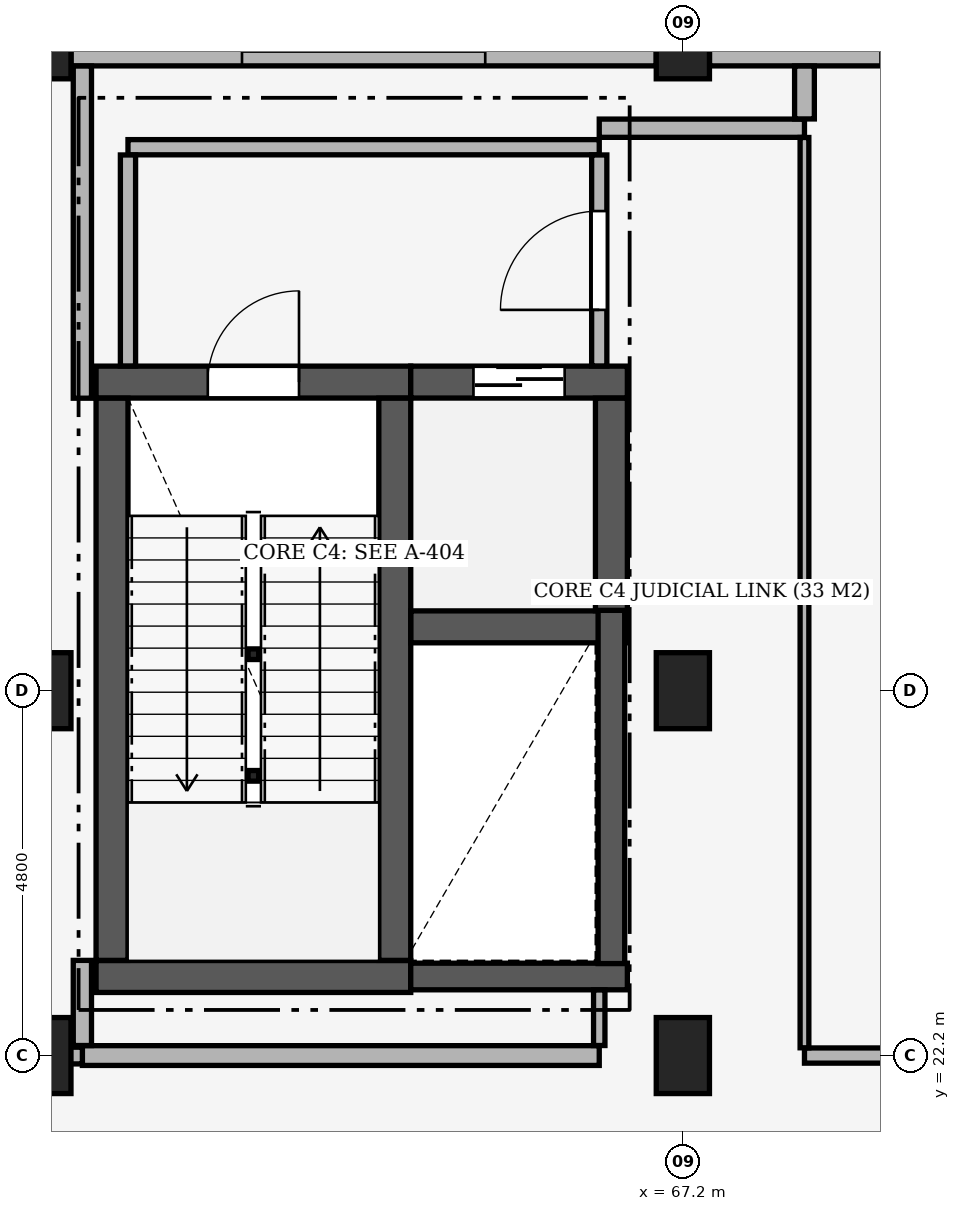
"""IFC4 building model, lengths in metres.
Left out: names, types, materials, properties, quantities, classifications, styles, units other than length and angle.
Written with IfcOpenShell. Run it as: python <this file> out.ifc"""

import sys

from ifc_helpers import new_model, si_unit, direction, frame, frame_2d, origin, origin_2d, place, context, subcontext, project, spatial, rectangle, hollow_circle, extrude, element, fill, save


model = new_model("IFC4")
c1 = context("Model", 3, precision=1e-05, world=origin(), true_north=direction((0.0, 1.0)))
c2 = subcontext(c1, "Body", "Model", "MODEL_VIEW")
j1 = project(units=[si_unit("LENGTHUNIT", "METRE"), si_unit("PLANEANGLEUNIT", "RADIAN")], contexts=[c1])
p1 = place(None, origin())
s1 = spatial("IfcSite", under=j1, at=p1, CompositionType="ELEMENT")
p2 = place(p1, origin())
s2 = spatial("IfcBuilding", under=s1, at=p2, CompositionType="ELEMENT")
p3 = place(p2, frame((0.0, 0.0, 5.1)))
s3 = spatial("IfcBuildingStorey", under=s2, at=p3, CompositionType="ELEMENT", Elevation=5.1)
for number, where, z_axis, x_axis in (
    (1, (58.8, 22.2, 0.0), (0.0, 0.0, 1.0), (1.0, 0.0, 0.0)),
    (2, (58.8, 27.0, 0.0), (0.0, 0.0, 1.0), (1.0, 0.0, 0.0)),
):
    element("IfcColumn", number, at=place(p3, frame(where, z_axis=z_axis, x_axis=x_axis)), inside=s3, PredefinedType="COLUMN", context=c2, shape_type="SweptSolid", body=[
        extrude(rectangle(XDim=0.7, YDim=1.0, at=origin_2d()), origin(), (0.0, 0.0, 1.0), 5.1),
    ])
p4 = place(p3, frame((58.8, 35.4, 0.0), z_axis=(0.0, 0.0, 1.0), x_axis=(1.0, 0.0, 0.0)))
e3 = element("IfcColumn", 3, at=p4, inside=s3, PredefinedType="COLUMN", context=c2, shape_type="SweptSolid", body=[
    extrude(rectangle(XDim=0.7, YDim=0.7, at=origin_2d()), origin(), (0.0, 0.0, 1.0), 5.1),
])
for number, where, z_axis, x_axis in (
    (4, (67.2, 22.2, 0.0), (0.0, 0.0, 1.0), (1.0, 0.0, 0.0)),
    (5, (67.2, 27.0, 0.0), (0.0, 0.0, 1.0), (1.0, 0.0, 0.0)),
):
    element("IfcColumn", number, at=place(p3, frame(where, z_axis=z_axis, x_axis=x_axis)), inside=s3, PredefinedType="COLUMN", context=c2, shape_type="SweptSolid", body=[
        extrude(rectangle(XDim=0.7, YDim=1.0, at=origin_2d()), origin(), (0.0, 0.0, 1.0), 5.1),
    ])
p5 = place(p3, frame((67.2, 35.4, 0.0), z_axis=(0.0, 0.0, 1.0), x_axis=(1.0, 0.0, 0.0)))
e6 = element("IfcColumn", 6, at=p5, inside=s3, PredefinedType="COLUMN", context=c2, shape_type="SweptSolid", body=[
    extrude(rectangle(XDim=0.7, YDim=0.7, at=origin_2d()), origin(), (0.0, 0.0, 1.0), 5.1),
])
for number, where, z_axis, x_axis in (
    (7, (61.55, 25.88, -2.98), (0.0, 0.0, 1.0), (1.0, 0.0, 0.0)),
    (8, (61.55, 27.48, -2.98), (0.0, 0.0, 1.0), (1.0, 0.0, 0.0)),
):
    element("IfcColumn", number, at=place(p3, frame(where, z_axis=z_axis, x_axis=x_axis)), inside=s3, PredefinedType="COLUMN", context=c2, shape_type="SweptSolid", body=[
        extrude(hollow_circle(Radius=0.07, WallThickness=0.008, at=origin_2d()), origin(), (0.0, 0.0, 1.0), 5.1),
    ])
p6 = place(p3, frame((59.15, 35.4, 0.0), z_axis=(0.0, 0.0, 1.0), x_axis=(1.0, 0.0, 0.0)))
e9 = element("IfcWall", 9, at=p6, inside=s3, PredefinedType="SOLIDWALL", context=c2, shape_type="SweptSolid", body=[
    extrude(rectangle(XDim=7.7, YDim=0.36, at=frame_2d((3.85, 0.0))), origin(), (0.0, 0.0, 1.0), 4.07),
])
p7 = place(p6, frame((2.25, 0.0, 0.75)))
e10 = element("IfcOpeningElement", 10, at=p7, cuts=e9, PredefinedType="OPENING", context=c2, shape_type="SweptSolid", body=[
    extrude(rectangle(XDim=3.2, YDim=2.6, at=frame_2d((1.6, 1.3))), frame((0.0, 0.195, 0.0), z_axis=(0.0, -1.0, 0.0), x_axis=(1.0, 0.0, 0.0)), (0.0, 0.0, 1.0), 0.39),
])
p8 = place(p3, frame((67.55, 35.4, 0.0), z_axis=(0.0, 0.0, 1.0), x_axis=(1.0, 0.0, 0.0)))
e11 = element("IfcWall", 11, at=p8, inside=s3, PredefinedType="SOLIDWALL", context=c2, shape_type="SweptSolid", body=[
    extrude(rectangle(XDim=7.7, YDim=0.36, at=frame_2d((3.85, 0.0))), origin(), (0.0, 0.0, 1.0), 4.07),
])
p9 = place(p8, frame((2.25, 0.0, 0.75)))
e12 = element("IfcOpeningElement", 12, at=p9, cuts=e11, PredefinedType="OPENING", context=c2, shape_type="SweptSolid", body=[
    extrude(rectangle(XDim=3.2, YDim=2.6, at=frame_2d((1.6, 1.3))), frame((0.0, 0.195, 0.0), z_axis=(0.0, -1.0, 0.0), x_axis=(1.0, 0.0, 0.0)), (0.0, 0.0, 1.0), 0.39),
])
p10 = place(p3, frame((59.48, 31.06, 0.0), z_axis=(0.0, 0.0, 1.0), x_axis=(1.0, 0.0, 0.0)))
e13 = element("IfcWall", 13, at=p10, inside=s3, PredefinedType="SHEAR", context=c2, shape_type="SweptSolid", body=[
    extrude(rectangle(XDim=4.14, YDim=0.42, at=frame_2d((2.07, 0.0))), origin(), (0.0, 0.0, 1.0), 4.82),
])
p11 = place(p10, frame((1.47, 0.0, 0.0)))
e14 = element("IfcOpeningElement", 14, at=p11, cuts=e13, PredefinedType="OPENING", context=c2, shape_type="SweptSolid", body=[
    extrude(rectangle(XDim=1.2, YDim=2.2, at=frame_2d((0.6, 1.1))), frame((0.0, 0.225, 0.0), z_axis=(0.0, -1.0, 0.0), x_axis=(1.0, 0.0, 0.0)), (0.0, 0.0, 1.0), 0.45),
])
p12 = place(p3, frame((59.48, 23.24, 0.0), z_axis=(0.0, 0.0, 1.0), x_axis=(1.0, 0.0, 0.0)))
e15 = element("IfcWall", 15, at=p12, inside=s3, PredefinedType="SHEAR", context=c2, shape_type="SweptSolid", body=[
    extrude(rectangle(XDim=4.14, YDim=0.42, at=frame_2d((2.07, 0.0))), origin(), (0.0, 0.0, 1.0), 4.82),
])
for number, where, z_axis, x_axis in (
    (16, (59.69, 23.452, 0.0), (0.0, 0.0, 1.0), (0.0, 1.0, 0.0)),
    (17, (63.41, 23.452, 0.0), (0.0, 0.0, 1.0), (0.0, 1.0, 0.0)),
):
    element("IfcWall", number, at=place(p3, frame(where, z_axis=z_axis, x_axis=x_axis)), inside=s3, PredefinedType="SHEAR", context=c2, shape_type="SweptSolid", body=[
        extrude(rectangle(XDim=7.396, YDim=0.42, at=frame_2d((3.698, 0.0))), origin(), (0.0, 0.0, 1.0), 4.82),
    ])
p13 = place(p3, frame((63.622, 27.84, 0.0), z_axis=(0.0, 0.0, 1.0), x_axis=(1.0, 0.0, 0.0)))
e18 = element("IfcWall", 18, at=p13, inside=s3, PredefinedType="SHEAR", context=c2, shape_type="SweptSolid", body=[
    extrude(rectangle(XDim=2.848, YDim=0.42, at=frame_2d((1.424, 0.0))), origin(), (0.0, 0.0, 1.0), 4.82),
])
p14 = place(p3, frame((63.62, 31.06, 0.0), z_axis=(0.0, 0.0, 1.0), x_axis=(1.0, 0.0, 0.0)))
e19 = element("IfcWall", 19, at=p14, inside=s3, PredefinedType="SHEAR", context=c2, shape_type="SweptSolid", body=[
    extrude(rectangle(XDim=2.85, YDim=0.42, at=frame_2d((1.425, 0.0))), origin(), (0.0, 0.0, 1.0), 4.82),
])
p15 = place(p14, frame((0.825, 0.0, 0.0)))
e20 = element("IfcOpeningElement", 20, at=p15, cuts=e19, PredefinedType="OPENING", context=c2, shape_type="SweptSolid", body=[
    extrude(rectangle(XDim=1.2, YDim=2.15, at=frame_2d((0.6, 1.075))), frame((0.0, 0.225, 0.0), z_axis=(0.0, -1.0, 0.0), x_axis=(1.0, 0.0, 0.0)), (0.0, 0.0, 1.0), 0.45),
])
p16 = place(p3, frame((66.26, 28.052, 0.0), z_axis=(0.0, 0.0, 1.0), x_axis=(0.0, 1.0, 0.0)))
e21 = element("IfcWall", 21, at=p16, inside=s3, PredefinedType="SHEAR", context=c2, shape_type="SweptSolid", body=[
    extrude(rectangle(XDim=2.796, YDim=0.42, at=frame_2d((1.398, 0.0))), origin(), (0.0, 0.0, 1.0), 4.82),
])
p17 = place(p3, frame((63.62, 23.24, 0.0), z_axis=(0.0, 0.0, 1.0), x_axis=(1.0, 0.0, 0.0)))
e22 = element("IfcWall", 22, at=p17, inside=s3, PredefinedType="SHEAR", context=c2, shape_type="SweptSolid", body=[
    extrude(rectangle(XDim=2.85, YDim=0.35, at=frame_2d((1.425, 0.0))), origin(), (0.0, 0.0, 1.0), 4.82),
])
p18 = place(p3, frame((66.26, 23.41, 0.0), z_axis=(0.0, 0.0, 1.0), x_axis=(0.0, 1.0, 0.0)))
e23 = element("IfcWall", 23, at=p18, inside=s3, PredefinedType="SHEAR", context=c2, shape_type="SweptSolid", body=[
    extrude(rectangle(XDim=4.647, YDim=0.35, at=frame_2d((2.323, 0.0))), origin(), (0.0, 0.0, 1.0), 4.82),
])
p19 = place(p3, frame((59.3, 22.2, 0.0), z_axis=(0.0, 0.0, 1.0), x_axis=(1.0, 0.0, 0.0)))
e24 = element("IfcWall", 24, at=p19, inside=s3, PredefinedType="PARTITIONING", context=c2, shape_type="SweptSolid", body=[
    extrude(rectangle(XDim=6.8, YDim=0.26, at=frame_2d((3.4, 0.0))), origin(), (0.0, 0.0, 1.0), 4.07),
])
p20 = place(p3, frame((49.0, 22.2, 0.0), z_axis=(0.0, 0.0, 1.0), x_axis=(1.0, 0.0, 0.0)))
e25 = element("IfcWall", 25, at=p20, inside=s3, PredefinedType="PARTITIONING", context=c2, shape_type="SweptSolid", body=[
    extrude(rectangle(XDim=10.3, YDim=0.22, at=frame_2d((5.15, 0.0))), origin(), (0.0, 0.0, 1.0), 4.07),
])
p21 = place(p20, frame((4.425, 0.0, 0.0)))
e26 = element("IfcOpeningElement", 26, at=p21, cuts=e25, PredefinedType="OPENING", context=c2, shape_type="SweptSolid", body=[
    extrude(rectangle(XDim=1.45, YDim=2.25, at=frame_2d((0.725, 1.125))), frame((0.0, 0.125, 0.0), z_axis=(0.0, -1.0, 0.0), x_axis=(1.0, 0.0, 0.0)), (0.0, 0.0, 1.0), 0.25),
])
p22 = place(p3, frame((68.8, 22.2, 0.0), z_axis=(0.0, 0.0, 1.0), x_axis=(1.0, 0.0, 0.0)))
e27 = element("IfcWall", 27, at=p22, inside=s3, PredefinedType="PARTITIONING", context=c2, shape_type="SweptSolid", body=[
    extrude(rectangle(XDim=19.2, YDim=0.2, at=frame_2d((9.6, 0.0))), origin(), (0.0, 0.0, 1.0), 4.07),
])
p23 = place(p22, frame((9.125, 0.0, 0.0)))
e28 = element("IfcOpeningElement", 28, at=p23, cuts=e27, PredefinedType="OPENING", context=c2, shape_type="SweptSolid", body=[
    extrude(rectangle(XDim=0.95, YDim=2.2, at=frame_2d((0.475, 1.1))), frame((0.0, 0.115, 0.0), z_axis=(0.0, -1.0, 0.0), x_axis=(1.0, 0.0, 0.0)), (0.0, 0.0, 1.0), 0.23),
])
p24 = place(p3, frame((59.9, 34.15, 0.0), z_axis=(0.0, 0.0, 1.0), x_axis=(1.0, 0.0, 0.0)))
e29 = element("IfcWall", 29, at=p24, inside=s3, PredefinedType="PARTITIONING", context=c2, shape_type="SweptSolid", body=[
    extrude(rectangle(XDim=6.2, YDim=0.2, at=frame_2d((3.1, 0.0))), origin(), (0.0, 0.0, 1.0), 4.82),
])
p25 = place(p3, frame((66.1, 34.4, 0.0), z_axis=(0.0, 0.0, 1.0), x_axis=(1.0, 0.0, 0.0)))
e30 = element("IfcWall", 30, at=p25, inside=s3, PredefinedType="PARTITIONING", context=c2, shape_type="SweptSolid", body=[
    extrude(rectangle(XDim=2.7, YDim=0.24, at=frame_2d((1.35, 0.0))), origin(), (0.0, 0.0, 1.0), 4.02),
])
p26 = place(p3, frame((59.3, 22.332, 0.0), z_axis=(0.0, 0.0, 1.0), x_axis=(0.0, 1.0, 0.0)))
e31 = element("IfcWall", 31, at=p26, inside=s3, PredefinedType="PARTITIONING", context=c2, shape_type="SweptSolid", body=[
    extrude(rectangle(XDim=1.12, YDim=0.24, at=frame_2d((0.56, 0.0))), origin(), (0.0, 0.0, 1.0), 4.07),
])
p27 = place(p3, frame((59.3, 30.848, 0.0), z_axis=(0.0, 0.0, 1.0), x_axis=(0.0, 1.0, 0.0)))
e32 = element("IfcWall", 32, at=p27, inside=s3, PredefinedType="PARTITIONING", context=c2, shape_type="SweptSolid", body=[
    extrude(rectangle(XDim=4.37, YDim=0.24, at=frame_2d((2.185, 0.0))), origin(), (0.0, 0.0, 1.0), 4.07),
])
p28 = place(p3, frame((59.9, 31.272, 0.0), z_axis=(0.0, 0.0, 1.0), x_axis=(0.0, 1.0, 0.0)))
e33 = element("IfcWall", 33, at=p28, inside=s3, PredefinedType="PARTITIONING", context=c2, shape_type="SweptSolid", body=[
    extrude(rectangle(XDim=2.776, YDim=0.2, at=frame_2d((1.388, 0.0))), origin(), (0.0, 0.0, 1.0), 4.37),
])
p29 = place(p3, frame((66.1, 31.272, 0.0), z_axis=(0.0, 0.0, 1.0), x_axis=(0.0, 1.0, 0.0)))
e34 = element("IfcWall", 34, at=p29, inside=s3, PredefinedType="PARTITIONING", context=c2, shape_type="SweptSolid", body=[
    extrude(rectangle(XDim=2.776, YDim=0.2, at=frame_2d((1.388, 0.0))), origin(), (0.0, 0.0, 1.0), 4.37),
])
p30 = place(p29, frame((0.738, 0.0, 0.0)))
e35 = element("IfcOpeningElement", 35, at=p30, cuts=e34, PredefinedType="OPENING", context=c2, shape_type="SweptSolid", body=[
    extrude(rectangle(XDim=1.3, YDim=2.2, at=frame_2d((0.65, 1.1))), frame((0.0, 0.115, 0.0), z_axis=(0.0, -1.0, 0.0), x_axis=(1.0, 0.0, 0.0)), (0.0, 0.0, 1.0), 0.23),
])
p31 = place(p3, frame((66.1, 22.332, 0.0), z_axis=(0.0, 0.0, 1.0), x_axis=(0.0, 1.0, 0.0)))
e36 = element("IfcWall", 36, at=p31, inside=s3, PredefinedType="PARTITIONING", context=c2, shape_type="SweptSolid", body=[
    extrude(rectangle(XDim=0.731, YDim=0.15, at=frame_2d((0.365, 0.0))), origin(), (0.0, 0.0, 1.0), 4.07),
])
p32 = place(p3, frame((68.8, 22.302, 0.0), z_axis=(0.0, 0.0, 1.0), x_axis=(0.0, 1.0, 0.0)))
e37 = element("IfcWall", 37, at=p32, inside=s3, PredefinedType="PARTITIONING", context=c2, shape_type="SweptSolid", body=[
    extrude(rectangle(XDim=11.976, YDim=0.115, at=frame_2d((5.988, 0.0))), origin(), (0.0, 0.0, 1.0), 4.07),
])
p33 = place(p3, frame((68.8, 34.522, 0.0), z_axis=(0.0, 0.0, 1.0), x_axis=(0.0, 1.0, 0.0)))
e38 = element("IfcWall", 38, at=p33, inside=s3, PredefinedType="PARTITIONING", context=c2, shape_type="SweptSolid", body=[
    extrude(rectangle(XDim=0.696, YDim=0.26, at=frame_2d((0.348, 0.0))), origin(), (0.0, 0.0, 1.0), 4.07),
])
p34 = place(p7, origin())
e39 = element("IfcWindow", 39, at=p34, inside=s3, PartitioningType="SINGLE_PANEL", PredefinedType="WINDOW", context=c2, shape_type="SweptSolid", body=[
    extrude(rectangle(XDim=3.2, YDim=2.6, at=frame_2d((1.6, 1.3))), frame((0.0, 0.03, 0.0), z_axis=(0.0, -1.0, 0.0), x_axis=(1.0, 0.0, 0.0)), (0.0, 0.0, 1.0), 0.06),
])
fill(e10, e39)
p35 = place(p11, origin())
e40 = element("IfcDoor", 40, at=p35, inside=s3, OperationType="SINGLE_SWING_RIGHT", PredefinedType="DOOR", context=c2, shape_type="SweptSolid", body=[
    extrude(rectangle(XDim=1.2, YDim=2.2, at=frame_2d((0.6, 1.1))), frame((0.0, 0.025, 0.0), z_axis=(0.0, -1.0, 0.0), x_axis=(1.0, 0.0, 0.0)), (0.0, 0.0, 1.0), 0.05),
])
fill(e14, e40)
p36 = place(p15, origin())
e41 = element("IfcDoor", 41, at=p36, inside=s3, OperationType="DOUBLE_DOOR_SLIDING", PredefinedType="DOOR", context=c2, shape_type="SweptSolid", body=[
    extrude(rectangle(XDim=1.2, YDim=2.15, at=frame_2d((0.6, 1.075))), frame((0.0, 0.025, 0.0), z_axis=(0.0, -1.0, 0.0), x_axis=(1.0, 0.0, 0.0)), (0.0, 0.0, 1.0), 0.05),
])
fill(e20, e41)
p37 = place(p30, origin())
e42 = element("IfcDoor", 42, at=p37, inside=s3, OperationType="SINGLE_SWING_LEFT", PredefinedType="DOOR", context=c2, shape_type="SweptSolid", body=[
    extrude(rectangle(XDim=1.3, YDim=2.2, at=frame_2d((0.65, 1.1))), frame((0.0, 0.025, 0.0), z_axis=(0.0, -1.0, 0.0), x_axis=(1.0, 0.0, 0.0)), (0.0, 0.0, 1.0), 0.05),
])
fill(e35, e42)
save(model, sys.argv[1])
